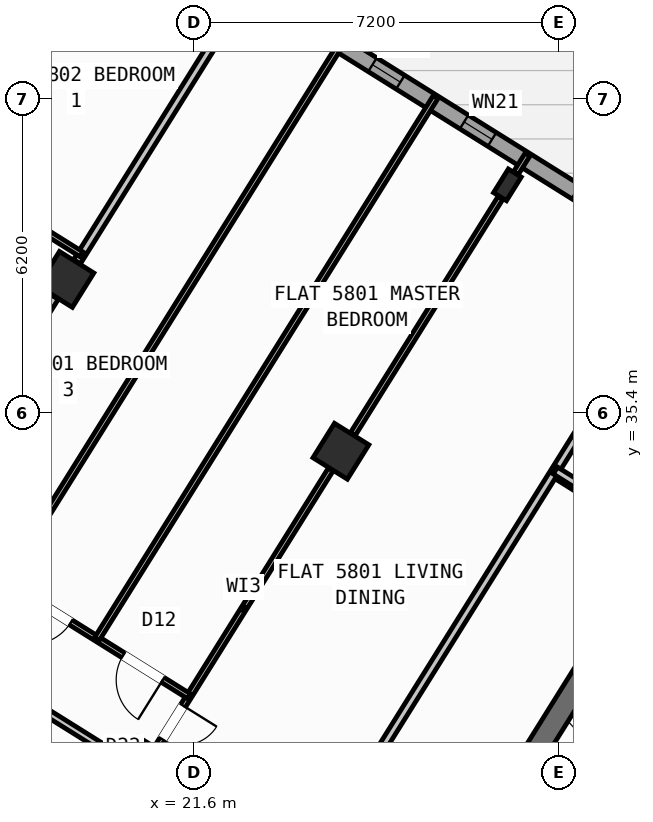
"""IFC4 building model, lengths in metres.
Left out: names, types, materials, properties, quantities, classifications, styles, units other than length and angle.
Written with IfcOpenShell. Run it as: python <this file> out.ifc"""

import sys

from ifc_helpers import new_model, si_unit, direction, frame, frame_2d, origin, origin_2d, place, context, subcontext, project, spatial, rectangle, hollow_rectangle, i_section, extrude, source, transform, mapped, element, fill, save


model = new_model("IFC4")
c1 = context("Model", 3, precision=1e-05, world=origin(), true_north=direction((0.0, 1.0)))
c2 = subcontext(c1, "Body", "Model", "MODEL_VIEW")
j1 = project(units=[si_unit("LENGTHUNIT", "METRE"), si_unit("PLANEANGLEUNIT", "RADIAN")], contexts=[c1])
p1 = place(None, origin())
s1 = spatial("IfcSite", under=j1, at=p1, CompositionType="ELEMENT")
p2 = place(p1, origin())
s2 = spatial("IfcBuilding", under=s1, at=p2, CompositionType="ELEMENT")
p3 = place(p2, frame((0.0, 0.0, 229.2)))
s3 = spatial("IfcBuildingStorey", under=s2, at=p3, CompositionType="ELEMENT", Elevation=229.2)
p4 = place(p3, frame((29.544, 30.636, 0.0), z_axis=(0.0, 0.0, 1.0), x_axis=(-0.529902075036, -0.848058836916, 0.0)))
e1 = element("IfcWall", 1, at=p4, inside=s3, PredefinedType="SHEAR", context=c2, shape_type="SweptSolid", body=[
    extrude(rectangle(XDim=3.625, YDim=0.45, at=frame_2d((1.812, 0.0))), origin(), (0.0, 0.0, 1.0), 4.22),
])
m1 = source(origin(), c2, "Body", "SweptSolid", [
    extrude(i_section(OverallWidth=0.3, OverallDepth=0.55, WebThickness=0.015, FlangeThickness=0.029, at=origin_2d()), origin(), (0.0, 0.0, 1.0), 4.5),
])
p5 = place(p3, frame((27.786, 39.901, 0.0), z_axis=(0.0, 0.0, 1.0), x_axis=(-0.848048096156, 0.529919264233, 0.0)))
e2 = element("IfcColumn", 2, at=p5, inside=s3, PredefinedType="COLUMN", context=c2, shape_type="MappedRepresentation", body=[
    mapped(m1, transform((0.0, 0.0, 0.0), scale=1.0)),
])
m2 = source(origin(), c2, "Body", "SweptSolid", [
    extrude(hollow_rectangle(XDim=0.8, YDim=0.8, WallThickness=0.032, at=origin_2d()), origin(), (0.0, 0.0, 1.0), 4.5),
])
for number, where, z_axis, x_axis in (
    (3, (24.5, 34.643, 0.0), (0.0, 0.0, 1.0), (-0.848, 0.53, 0.0)),
    (4, (20.632, 28.452, 0.0), (0.0, 0.0, 1.0), (-0.848, 0.53, 0.0)),
    (5, (19.073, 38.034, 0.0), (0.0, 0.0, 1.0), (-0.848, 0.53, 0.0)),
):
    element("IfcColumn", number, at=place(p3, frame(where, z_axis=z_axis, x_axis=x_axis)), inside=s3, PredefinedType="COLUMN", context=c2, shape_type="MappedRepresentation", body=[
        mapped(m2, transform((0.0, 0.0, 0.0), scale=1.0)),
    ])
p6 = place(p3, frame((17.424, 47.083, 0.0), z_axis=(0.0, 0.0, 1.0), x_axis=(0.848049927979, -0.529916332693, 0.0)))
e6 = element("IfcWall", 6, at=p6, inside=s3, PredefinedType="STANDARD", context=c2, shape_type="SweptSolid", body=[
    extrude(rectangle(XDim=29.223, YDim=0.32, at=frame_2d((14.612, 0.0))), origin(), (0.0, 0.0, 1.0), 4.22),
])
p7 = place(p6, frame((3.709, 0.0, 0.0)))
e7 = element("IfcOpeningElement", 7, at=p7, cuts=e6, PredefinedType="OPENING", context=c2, shape_type="SweptSolid", body=[
    extrude(rectangle(XDim=1.05, YDim=2.15, at=frame_2d((0.525, 1.075))), frame((0.0, 0.17, 0.0), z_axis=(0.0, -1.0, 0.0), x_axis=(1.0, 0.0, 0.0)), (0.0, 0.0, 1.0), 0.34),
])
p8 = place(p6, frame((0.809, 0.0, 1.0)))
e8 = element("IfcOpeningElement", 8, at=p8, cuts=e6, PredefinedType="OPENING", context=c2, shape_type="SweptSolid", body=[
    extrude(rectangle(XDim=0.9, YDim=1.25, at=frame_2d((0.45, 0.625))), frame((0.0, 0.17, 0.0), z_axis=(0.0, -1.0, 0.0), x_axis=(1.0, 0.0, 0.0)), (0.0, 0.0, 1.0), 0.34),
])
p9 = place(p6, frame((13.811, 0.0, 0.9)))
e9 = element("IfcOpeningElement", 9, at=p9, cuts=e6, PredefinedType="OPENING", context=c2, shape_type="SweptSolid", body=[
    extrude(rectangle(XDim=1.35, YDim=1.45, at=frame_2d((0.675, 0.725))), frame((0.0, 0.17, 0.0), z_axis=(0.0, -1.0, 0.0), x_axis=(1.0, 0.0, 0.0)), (0.0, 0.0, 1.0), 0.34),
])
p10 = place(p6, frame((17.254, 0.0, 1.0)))
e10 = element("IfcOpeningElement", 10, at=p10, cuts=e6, PredefinedType="OPENING", context=c2, shape_type="SweptSolid", body=[
    extrude(rectangle(XDim=0.9, YDim=1.25, at=frame_2d((0.45, 0.625))), frame((0.0, 0.17, 0.0), z_axis=(0.0, -1.0, 0.0), x_axis=(1.0, 0.0, 0.0)), (0.0, 0.0, 1.0), 0.34),
])
p11 = place(p6, frame((21.364, 0.0, 1.0)))
e11 = element("IfcOpeningElement", 11, at=p11, cuts=e6, PredefinedType="OPENING", context=c2, shape_type="SweptSolid", body=[
    extrude(rectangle(XDim=0.9, YDim=1.25, at=frame_2d((0.45, 0.625))), frame((0.0, 0.17, 0.0), z_axis=(0.0, -1.0, 0.0), x_axis=(1.0, 0.0, 0.0)), (0.0, 0.0, 1.0), 0.34),
])
p12 = place(p6, frame((26.003, 0.0, 1.0)))
e12 = element("IfcOpeningElement", 12, at=p12, cuts=e6, PredefinedType="OPENING", context=c2, shape_type="SweptSolid", body=[
    extrude(rectangle(XDim=0.9, YDim=1.25, at=frame_2d((0.45, 0.625))), frame((0.0, 0.17, 0.0), z_axis=(0.0, -1.0, 0.0), x_axis=(1.0, 0.0, 0.0)), (0.0, 0.0, 1.0), 0.34),
])
p13 = place(p6, frame((11.211, 0.0, 1.0)))
e13 = element("IfcOpeningElement", 13, at=p13, cuts=e6, PredefinedType="OPENING", context=c2, shape_type="SweptSolid", body=[
    extrude(rectangle(XDim=0.65, YDim=1.15, at=frame_2d((0.325, 0.575))), frame((0.0, 0.17, 0.0), z_axis=(0.0, -1.0, 0.0), x_axis=(1.0, 0.0, 0.0)), (0.0, 0.0, 1.0), 0.34),
])
p14 = place(p6, frame((9.079, 0.0, 1.0)))
e14 = element("IfcOpeningElement", 14, at=p14, cuts=e6, PredefinedType="OPENING", context=c2, shape_type="SweptSolid", body=[
    extrude(rectangle(XDim=0.65, YDim=1.15, at=frame_2d((0.325, 0.575))), frame((0.0, 0.17, 0.0), z_axis=(0.0, -1.0, 0.0), x_axis=(1.0, 0.0, 0.0)), (0.0, 0.0, 1.0), 0.34),
])
p15 = place(p6, frame((6.951, 0.0, 1.0)))
e15 = element("IfcOpeningElement", 15, at=p15, cuts=e6, PredefinedType="OPENING", context=c2, shape_type="SweptSolid", body=[
    extrude(rectangle(XDim=0.65, YDim=1.15, at=frame_2d((0.325, 0.575))), frame((0.0, 0.17, 0.0), z_axis=(0.0, -1.0, 0.0), x_axis=(1.0, 0.0, 0.0)), (0.0, 0.0, 1.0), 0.34),
])
p16 = place(p3, frame((30.914, 32.829, 0.0), z_axis=(0.0, 0.0, 1.0), x_axis=(-0.848008813643, 0.529982124211, 0.0)))
e16 = element("IfcWall", 16, at=p16, inside=s3, PredefinedType="PARTITIONING", context=c2, shape_type="SweptSolid", body=[
    extrude(rectangle(XDim=2.61, YDim=0.16, at=frame_2d((1.305, 0.0))), origin(), (0.0, 0.0, 1.0), 4.21),
])
p17 = place(p3, frame((31.239, 38.274, 0.0), z_axis=(0.0, 0.0, 1.0), x_axis=(-0.529921796515, -0.848046513806, 0.0)))
e17 = element("IfcWall", 17, at=p17, inside=s3, PredefinedType="PARTITIONING", context=c2, shape_type="SweptSolid", body=[
    extrude(rectangle(XDim=16.5, YDim=0.16, at=frame_2d((8.25, 0.0))), origin(), (0.0, 0.0, 1.0), 4.21),
])
p18 = place(p3, frame((22.495, 24.281, 0.0), z_axis=(0.0, 0.0, 1.0), x_axis=(-0.848052408131, 0.529912363569, 0.0)))
e18 = element("IfcWall", 18, at=p18, inside=s3, PredefinedType="PARTITIONING", context=c2, shape_type="SweptSolid", body=[
    extrude(rectangle(XDim=16.73, YDim=0.16, at=frame_2d((8.365, 0.0))), origin(), (0.0, 0.0, 1.0), 4.21),
])
p19 = place(p18, frame((1.385, 0.0, 0.0)))
e19 = element("IfcOpeningElement", 19, at=p19, cuts=e18, PredefinedType="OPENING", context=c2, shape_type="SweptSolid", body=[
    extrude(rectangle(XDim=1.0, YDim=2.1, at=frame_2d((0.5, 1.05))), frame((0.0, 0.09, 0.0), z_axis=(0.0, -1.0, 0.0), x_axis=(1.0, 0.0, 0.0)), (0.0, 0.0, 1.0), 0.18),
])
p20 = place(p18, frame((14.76, 0.0, 0.0)))
e20 = element("IfcOpeningElement", 20, at=p20, cuts=e18, PredefinedType="OPENING", context=c2, shape_type="SweptSolid", body=[
    extrude(rectangle(XDim=1.0, YDim=2.1, at=frame_2d((0.5, 1.05))), frame((0.0, 0.09, 0.0), z_axis=(0.0, -1.0, 0.0), x_axis=(1.0, 0.0, 0.0)), (0.0, 0.0, 1.0), 0.18),
])
p21 = place(p3, frame((21.329, 22.416, 0.0), z_axis=(0.0, 0.0, 1.0), x_axis=(-0.848052408131, 0.529912363569, 0.0)))
e21 = element("IfcWall", 21, at=p21, inside=s3, PredefinedType="PARTITIONING", context=c2, shape_type="SweptSolid", body=[
    extrude(rectangle(XDim=16.73, YDim=0.16, at=frame_2d((8.365, 0.0))), origin(), (0.0, 0.0, 1.0), 4.21),
])
p22 = place(p21, frame((1.505, 0.0, 0.0)))
e22 = element("IfcOpeningElement", 22, at=p22, cuts=e21, PredefinedType="OPENING", context=c2, shape_type="SweptSolid", body=[
    extrude(rectangle(XDim=1.0, YDim=2.1, at=frame_2d((0.5, 1.05))), frame((0.0, 0.09, 0.0), z_axis=(0.0, -1.0, 0.0), x_axis=(1.0, 0.0, 0.0)), (0.0, 0.0, 1.0), 0.18),
])
p23 = place(p21, frame((6.435, 0.0, 0.0)))
e23 = element("IfcOpeningElement", 23, at=p23, cuts=e21, PredefinedType="OPENING", context=c2, shape_type="SweptSolid", body=[
    extrude(rectangle(XDim=1.0, YDim=2.1, at=frame_2d((0.5, 1.05))), frame((0.0, 0.09, 0.0), z_axis=(0.0, -1.0, 0.0), x_axis=(1.0, 0.0, 0.0)), (0.0, 0.0, 1.0), 0.18),
])
p24 = place(p21, frame((12.784, 0.0, 0.0)))
e24 = element("IfcOpeningElement", 24, at=p24, cuts=e21, PredefinedType="OPENING", context=c2, shape_type="SweptSolid", body=[
    extrude(rectangle(XDim=1.0, YDim=2.1, at=frame_2d((0.5, 1.05))), frame((0.0, 0.09, 0.0), z_axis=(0.0, -1.0, 0.0), x_axis=(1.0, 0.0, 0.0)), (0.0, 0.0, 1.0), 0.18),
])
p25 = place(p3, frame((22.206, 43.049, 0.0), z_axis=(0.0, 0.0, 1.0), x_axis=(-0.529919150083, -0.848048167486, 0.0)))
e25 = element("IfcWall", 25, at=p25, inside=s3, PredefinedType="PARTITIONING", context=c2, shape_type="SweptSolid", body=[
    extrude(rectangle(XDim=5.501, YDim=0.16, at=frame_2d((2.75, 0.0))), origin(), (0.0, 0.0, 1.0), 4.21),
])
p26 = place(p3, frame((18.854, 37.685, 0.0), z_axis=(0.0, 0.0, 1.0), x_axis=(-0.529907440938, -0.848055484057, 0.0)))
e26 = element("IfcWall", 26, at=p26, inside=s3, PredefinedType="PARTITIONING", context=c2, shape_type="SweptSolid", body=[
    extrude(rectangle(XDim=6.476, YDim=0.16, at=frame_2d((3.238, 0.0))), origin(), (0.0, 0.0, 1.0), 2.395),
])
p27 = place(p3, frame((28.184, 40.501, 0.0), z_axis=(0.0, 0.0, 1.0), x_axis=(-0.529593308415, -0.848251688877, 0.0)))
e27 = element("IfcWall", 27, at=p27, inside=s3, PredefinedType="PARTITIONING", context=c2, shape_type="SweptSolid", body=[
    extrude(rectangle(XDim=0.433, YDim=0.11, at=frame_2d((0.216, 0.0))), origin(), (0.0, 0.0, 1.0), 4.21),
])
p28 = place(p3, frame((27.651, 39.647, 0.0), z_axis=(0.0, 0.0, 1.0), x_axis=(-0.529919150083, -0.848048167486, 0.0)))
e28 = element("IfcWall", 28, at=p28, inside=s3, PredefinedType="PARTITIONING", context=c2, shape_type="SweptSolid", body=[
    extrude(rectangle(XDim=5.501, YDim=0.11, at=frame_2d((2.75, 0.0))), origin(), (0.0, 0.0, 1.0), 4.21),
])
p29 = place(p3, frame((24.299, 34.283, 0.0), z_axis=(0.0, 0.0, 1.0), x_axis=(-0.529890499457, -0.848066069705, 0.0)))
e29 = element("IfcWall", 29, at=p29, inside=s3, PredefinedType="PARTITIONING", context=c2, shape_type="SweptSolid", body=[
    extrude(rectangle(XDim=6.476, YDim=0.11, at=frame_2d((3.238, 0.0))), origin(), (0.0, 0.0, 1.0), 2.395),
])
p30 = place(p29, frame((5.496, 0.0, 0.0)))
e30 = element("IfcOpeningElement", 30, at=p30, cuts=e29, PredefinedType="OPENING", context=c2, shape_type="SweptSolid", body=[
    extrude(rectangle(XDim=0.78, YDim=2.05, at=frame_2d((0.39, 1.025))), frame((0.0, 0.065, 0.0), z_axis=(0.0, -1.0, 0.0), x_axis=(1.0, 0.0, 0.0)), (0.0, 0.0, 1.0), 0.13),
])
p31 = place(p3, frame((20.203, 28.543, 0.0), z_axis=(0.0, 0.0, 1.0), x_axis=(-0.848049955116, 0.529916289265, 0.0)))
e31 = element("IfcWall", 31, at=p31, inside=s3, PredefinedType="PLUMBINGWALL", context=c2, shape_type="SweptSolid", body=[
    extrude(rectangle(XDim=5.576, YDim=0.14, at=frame_2d((2.788, 0.0))), origin(), (0.0, 0.0, 1.0), 3.745),
])
p32 = place(p31, frame((2.338, 0.0, 0.0)))
e32 = element("IfcOpeningElement", 32, at=p32, cuts=e31, PredefinedType="OPENING", context=c2, shape_type="SweptSolid", body=[
    extrude(rectangle(XDim=0.78, YDim=2.05, at=frame_2d((0.39, 1.025))), frame((0.0, 0.08, 0.0), z_axis=(0.0, -1.0, 0.0), x_axis=(1.0, 0.0, 0.0)), (0.0, 0.0, 1.0), 0.16),
])
p33 = place(p3, frame((21.502, 29.807, 0.0), z_axis=(0.0, 0.0, 1.0), x_axis=(-0.848051709137, 0.529913482212, 0.0)))
e33 = element("IfcWall", 33, at=p33, inside=s3, PredefinedType="PARTITIONING", context=c2, shape_type="SweptSolid", body=[
    extrude(rectangle(XDim=6.42, YDim=0.11, at=frame_2d((3.21, 0.0))), origin(), (0.0, 0.0, 1.0), 4.21),
])
p34 = place(p33, frame((0.61, 0.0, 0.0)))
e34 = element("IfcOpeningElement", 34, at=p34, cuts=e33, PredefinedType="OPENING", context=c2, shape_type="SweptSolid", body=[
    extrude(rectangle(XDim=0.92, YDim=2.08, at=frame_2d((0.46, 1.04))), frame((0.0, 0.065, 0.0), z_axis=(0.0, -1.0, 0.0), x_axis=(1.0, 0.0, 0.0)), (0.0, 0.0, 1.0), 0.13),
])
p35 = place(p33, frame((2.75, 0.0, 0.0)))
e35 = element("IfcOpeningElement", 35, at=p35, cuts=e33, PredefinedType="OPENING", context=c2, shape_type="SweptSolid", body=[
    extrude(rectangle(XDim=0.92, YDim=2.08, at=frame_2d((0.46, 1.04))), frame((0.0, 0.065, 0.0), z_axis=(0.0, -1.0, 0.0), x_axis=(1.0, 0.0, 0.0)), (0.0, 0.0, 1.0), 0.13),
])
p36 = place(p33, frame((4.89, 0.0, 0.0)))
e36 = element("IfcOpeningElement", 36, at=p36, cuts=e33, PredefinedType="OPENING", context=c2, shape_type="SweptSolid", body=[
    extrude(rectangle(XDim=0.92, YDim=2.08, at=frame_2d((0.46, 1.04))), frame((0.0, 0.065, 0.0), z_axis=(0.0, -1.0, 0.0), x_axis=(1.0, 0.0, 0.0)), (0.0, 0.0, 1.0), 0.13),
])
p37 = place(p3, frame((26.37, 41.635, 0.0), z_axis=(0.0, 0.0, 1.0), x_axis=(-0.529925845384, -0.848043983761, 0.0)))
e37 = element("IfcWall", 37, at=p37, inside=s3, PredefinedType="PARTITIONING", context=c2, shape_type="SweptSolid", body=[
    extrude(rectangle(XDim=12.61, YDim=0.11, at=frame_2d((6.305, 0.0))), origin(), (0.0, 0.0, 1.0), 3.895),
])
p38 = place(p3, frame((24.555, 42.769, 0.0), z_axis=(0.0, 0.0, 1.0), x_axis=(-0.529911921261, -0.848052684511, 0.0)))
e38 = element("IfcWall", 38, at=p38, inside=s3, PredefinedType="PARTITIONING", context=c2, shape_type="SweptSolid", body=[
    extrude(rectangle(XDim=12.61, YDim=0.11, at=frame_2d((6.305, 0.0))), origin(), (0.0, 0.0, 1.0), 3.895),
])
p39 = place(p3, frame((19.67, 45.821, 0.0), z_axis=(0.0, 0.0, 1.0), x_axis=(-0.529920421309, -0.848047373134, 0.0)))
e39 = element("IfcWall", 39, at=p39, inside=s3, PredefinedType="PARTITIONING", context=c2, shape_type="SweptSolid", body=[
    extrude(rectangle(XDim=16.77, YDim=0.11, at=frame_2d((8.385, 0.0))), origin(), (0.0, 0.0, 1.0), 4.21),
])
p40 = place(p39, frame((15.13, 0.0, 0.0)))
e40 = element("IfcOpeningElement", 40, at=p40, cuts=e39, PredefinedType="OPENING", context=c2, shape_type="SweptSolid", body=[
    extrude(rectangle(XDim=0.78, YDim=2.05, at=frame_2d((0.39, 1.025))), frame((0.0, 0.065, 0.0), z_axis=(0.0, -1.0, 0.0), x_axis=(1.0, 0.0, 0.0)), (0.0, 0.0, 1.0), 0.13),
])
p41 = place(p39, frame((9.884, 0.0, 0.0)))
e41 = element("IfcOpeningElement", 41, at=p41, cuts=e39, PredefinedType="OPENING", context=c2, shape_type="SweptSolid", body=[
    extrude(rectangle(XDim=0.92, YDim=2.08, at=frame_2d((0.46, 1.04))), frame((0.0, 0.065, 0.0), z_axis=(0.0, -1.0, 0.0), x_axis=(1.0, 0.0, 0.0)), (0.0, 0.0, 1.0), 0.13),
])
p42 = place(p3, frame((19.382, 38.529, 0.0), z_axis=(0.0, 0.0, 1.0), x_axis=(-0.848051346257, 0.52991406295, 0.0)))
e42 = element("IfcWall", 42, at=p42, inside=s3, PredefinedType="PARTITIONING", context=c2, shape_type="SweptSolid", body=[
    extrude(rectangle(XDim=3.62, YDim=0.11, at=frame_2d((1.81, 0.0))), origin(), (0.0, 0.0, 1.0), 4.21),
])
p43 = place(p42, frame((1.35, 0.0, 0.0)))
e43 = element("IfcOpeningElement", 43, at=p43, cuts=e42, PredefinedType="OPENING", context=c2, shape_type="SweptSolid", body=[
    extrude(rectangle(XDim=0.92, YDim=2.08, at=frame_2d((0.46, 1.04))), frame((0.0, 0.065, 0.0), z_axis=(0.0, -1.0, 0.0), x_axis=(1.0, 0.0, 0.0)), (0.0, 0.0, 1.0), 0.13),
])
p44 = place(p3, frame((41.936, 26.012, 0.0), z_axis=(0.0, 0.0, 1.0), x_axis=(-0.848051154596, 0.529914369676, 0.0)))
e44 = element("IfcWall", 44, at=p44, inside=s3, PredefinedType="PARTITIONING", context=c2, shape_type="SweptSolid", body=[
    extrude(rectangle(XDim=15.57, YDim=0.16, at=frame_2d((7.785, 0.0))), origin(), (0.0, 0.0, 1.0), 4.21),
])
p45 = place(p44, frame((10.83, 0.0, 0.0)))
e45 = element("IfcOpeningElement", 45, at=p45, cuts=e44, PredefinedType="OPENING", context=c2, shape_type="SweptSolid", body=[
    extrude(rectangle(XDim=1.0, YDim=2.1, at=frame_2d((0.5, 1.05))), frame((0.0, 0.09, 0.0), z_axis=(0.0, -1.0, 0.0), x_axis=(1.0, 0.0, 0.0)), (0.0, 0.0, 1.0), 0.18),
])
m3 = source(origin(), c2, "Body", "SweptSolid", [
    extrude(rectangle(XDim=0.65, YDim=1.15, at=frame_2d((0.325, 0.575))), frame((0.0, 0.03, 0.0), z_axis=(0.0, -1.0, 0.0), x_axis=(1.0, 0.0, 0.0)), (0.0, 0.0, 1.0), 0.06),
])
p46 = place(p13, origin())
e46 = element("IfcWindow", 46, at=p46, inside=s3, PartitioningType="SINGLE_PANEL", PredefinedType="WINDOW", context=c2, shape_type="MappedRepresentation", body=[
    mapped(m3, transform((0.0, 0.0, 0.0), scale=1.0)),
])
fill(e13, e46)
p47 = place(p14, origin())
e47 = element("IfcWindow", 47, at=p47, inside=s3, PartitioningType="SINGLE_PANEL", PredefinedType="WINDOW", context=c2, shape_type="MappedRepresentation", body=[
    mapped(m3, transform((0.0, 0.0, 0.0), scale=1.0)),
])
fill(e14, e47)
m4 = source(origin(), c2, "Body", "SweptSolid", [
    extrude(rectangle(XDim=0.78, YDim=2.05, at=frame_2d((0.39, 1.025))), frame((0.0, 0.025, 0.0), z_axis=(0.0, -1.0, 0.0), x_axis=(1.0, 0.0, 0.0)), (0.0, 0.0, 1.0), 0.05),
])
p48 = place(p30, origin())
e48 = element("IfcDoor", 48, at=p48, inside=s3, OperationType="SINGLE_SWING_LEFT", PredefinedType="DOOR", context=c2, shape_type="MappedRepresentation", body=[
    mapped(m4, transform((0.0, 0.0, 0.0), scale=1.0)),
])
fill(e30, e48)
m5 = source(origin(), c2, "Body", "SweptSolid", [
    extrude(rectangle(XDim=0.92, YDim=2.08, at=frame_2d((0.46, 1.04))), frame((0.0, 0.025, 0.0), z_axis=(0.0, -1.0, 0.0), x_axis=(1.0, 0.0, 0.0)), (0.0, 0.0, 1.0), 0.05),
])
p49 = place(p34, origin())
e49 = element("IfcDoor", 49, at=p49, inside=s3, OperationType="SINGLE_SWING_LEFT", PredefinedType="DOOR", context=c2, shape_type="MappedRepresentation", body=[
    mapped(m5, transform((0.0, 0.0, 0.0), scale=1.0)),
])
fill(e34, e49)
p50 = place(p35, origin())
e50 = element("IfcDoor", 50, at=p50, inside=s3, OperationType="SINGLE_SWING_RIGHT", PredefinedType="DOOR", context=c2, shape_type="MappedRepresentation", body=[
    mapped(m5, transform((0.0, 0.0, 0.0), scale=1.0)),
])
fill(e35, e50)
save(model, sys.argv[1])
